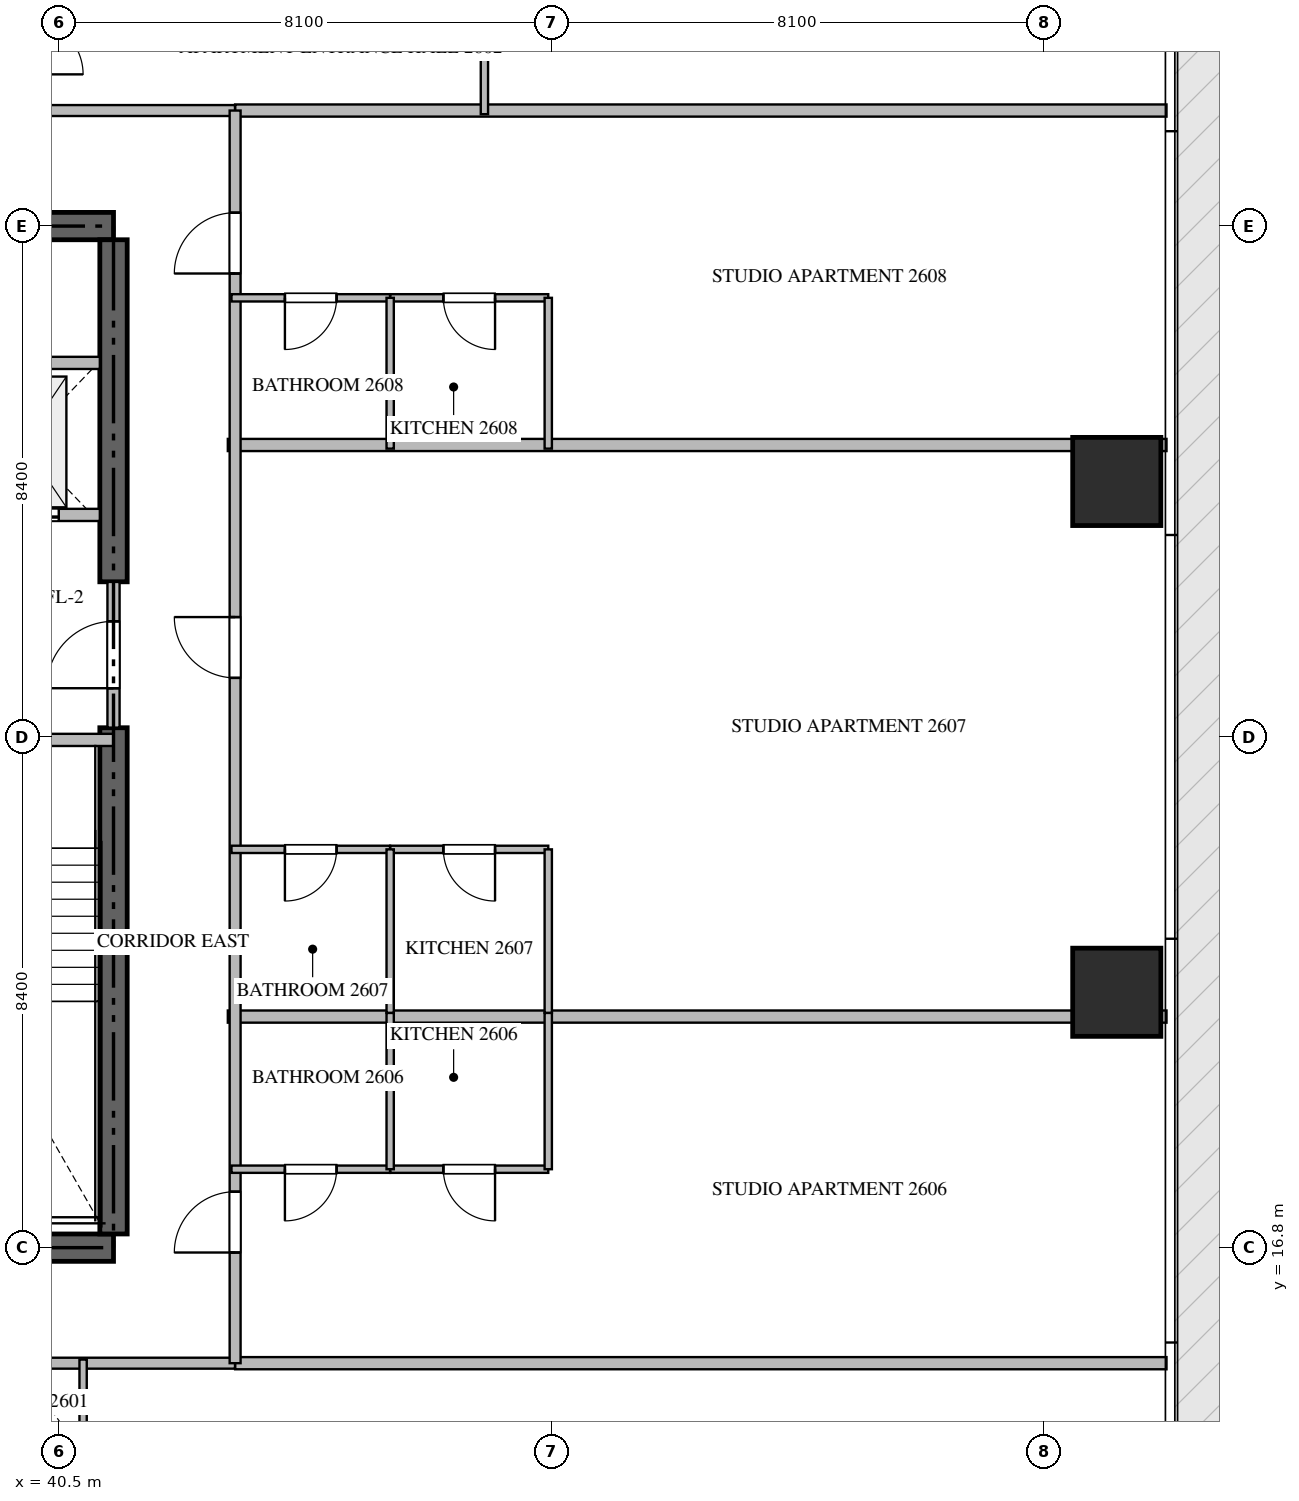
"""IFC4 building model, lengths in metres.
Left out: names, types, materials, properties, quantities, classifications, styles, units other than length and angle.
Written with IfcOpenShell. Run it as: python <this file> out.ifc"""

import sys

from ifc_helpers import new_model, si_unit, direction, frame, frame_2d, origin, origin_2d, place, context, subcontext, project, spatial, rectangle, extrude, source, transform, mapped, element, fill, save


model = new_model("IFC4")
c1 = context("Model", 3, precision=1e-05, world=origin(), true_north=direction((0.0, 1.0)))
c2 = subcontext(c1, "Body", "Model", "MODEL_VIEW")
j1 = project(units=[si_unit("LENGTHUNIT", "METRE"), si_unit("PLANEANGLEUNIT", "RADIAN")], contexts=[c1])
p1 = place(None, origin())
s1 = spatial("IfcSite", under=j1, at=p1, CompositionType="ELEMENT")
p2 = place(p1, origin())
s2 = spatial("IfcBuilding", under=s1, at=p2, CompositionType="ELEMENT")
p3 = place(p2, frame((0.0, 0.0, 105.45)))
s3 = spatial("IfcBuildingStorey", under=s2, at=p3, CompositionType="ELEMENT", Elevation=105.45)
for number, where, z_axis, x_axis in (
    (1, (23.4, 16.8, -0.26), (0.0, 0.0, 1.0), (1.0, 0.0, 0.0)),
    (2, (41.4, 33.6, -0.26), (0.0, 0.0, 1.0), (-1.0, 0.0, 0.0)),
):
    element("IfcWall", number, at=place(p3, frame(where, z_axis=z_axis, x_axis=x_axis)), inside=s3, PredefinedType="SHEAR", context=c2, shape_type="SweptSolid", body=[
        extrude(rectangle(XDim=18.0, YDim=0.45, at=frame_2d((9.0, 0.0))), origin(), (0.0, 0.0, 1.0), 3.648),
    ])
p4 = place(p3, frame((41.4, 17.025, -0.26), z_axis=(0.0, 0.0, 1.0), x_axis=(0.0, 1.0, 0.0)))
e3 = element("IfcWall", 3, at=p4, inside=s3, PredefinedType="SHEAR", context=c2, shape_type="SweptSolid", body=[
    extrude(rectangle(XDim=8.325, YDim=0.45, at=frame_2d((4.163, 0.0))), origin(), (0.0, 0.0, 1.0), 3.648),
])
p5 = place(p3, frame((41.4, 27.75, -0.26), z_axis=(0.0, 0.0, 1.0), x_axis=(0.0, 1.0, 0.0)))
e4 = element("IfcWall", 4, at=p5, inside=s3, PredefinedType="SHEAR", context=c2, shape_type="SweptSolid", body=[
    extrude(rectangle(XDim=5.625, YDim=0.45, at=frame_2d((2.812, 0.0))), origin(), (0.0, 0.0, 1.0), 3.648),
])
m1 = source(origin(), c2, "Body", "SweptSolid", [
    extrude(rectangle(XDim=1.45, YDim=1.45, at=origin_2d()), origin(), (0.0, 0.0, 1.0), 3.65),
])
for number, where, z_axis, x_axis in (
    (5, (57.9, 21.0, -0.26), (0.0, 0.0, 1.0), (1.0, 0.0, 0.0)),
    (6, (57.9, 29.4, -0.26), (0.0, 0.0, 1.0), (1.0, 0.0, 0.0)),
):
    element("IfcColumn", number, at=place(p3, frame(where, z_axis=z_axis, x_axis=x_axis)), inside=s3, PredefinedType="COLUMN", context=c2, shape_type="MappedRepresentation", body=[
        mapped(m1, transform((0.0, 0.0, 0.0), scale=1.0)),
    ])
p6 = place(p3, frame((36.95, 25.15, 0.0), z_axis=(0.0, 0.0, 1.0), x_axis=(1.0, 0.0, 0.0)))
e7 = element("IfcWall", 7, at=p6, inside=s3, PredefinedType="STANDARD", context=c2, shape_type="SweptSolid", body=[
    extrude(rectangle(XDim=4.45, YDim=0.2, at=frame_2d((2.225, 0.0))), origin(), (0.0, 0.0, 1.0), 3.39),
])
p7 = place(p6, frame((1.65, 0.0, 0.0)))
e8 = element("IfcOpeningElement", 8, at=p7, cuts=e7, PredefinedType="OPENING", context=c2, shape_type="SweptSolid", body=[
    extrude(rectangle(XDim=1.1, YDim=2.15, at=frame_2d((0.55, 1.075))), frame((0.0, 0.11, 0.0), z_axis=(0.0, -1.0, 0.0), x_axis=(1.0, 0.0, 0.0)), (0.0, 0.0, 1.0), 0.22),
])
p8 = place(p3, frame((38.75, 28.85, 0.0), z_axis=(0.0, 0.0, 1.0), x_axis=(1.0, 0.0, 0.0)))
e9 = element("IfcWall", 9, at=p8, inside=s3, PredefinedType="STANDARD", context=c2, shape_type="SweptSolid", body=[
    extrude(rectangle(XDim=2.425, YDim=0.2, at=frame_2d((1.212, 0.0))), origin(), (0.0, 0.0, 1.0), 3.39),
])
p9 = place(p8, frame((0.55, 0.0, 0.0)))
e10 = element("IfcOpeningElement", 10, at=p9, cuts=e9, PredefinedType="OPENING", context=c2, shape_type="SweptSolid", body=[
    extrude(rectangle(XDim=1.2, YDim=2.2, at=frame_2d((0.6, 1.1))), frame((0.0, 0.11, 0.0), z_axis=(0.0, -1.0, 0.0), x_axis=(1.0, 0.0, 0.0)), (0.0, 0.0, 1.0), 0.22),
])
p10 = place(p3, frame((38.75, 31.35, 0.0), z_axis=(0.0, 0.0, 1.0), x_axis=(1.0, 0.0, 0.0)))
e11 = element("IfcWall", 11, at=p10, inside=s3, PredefinedType="STANDARD", context=c2, shape_type="SweptSolid", body=[
    extrude(rectangle(XDim=2.425, YDim=0.2, at=frame_2d((1.212, 0.0))), origin(), (0.0, 0.0, 1.0), 3.39),
])
p11 = place(p3, frame((41.4, 25.352, 0.0), z_axis=(0.0, 0.0, 1.0), x_axis=(0.0, 1.0, 0.0)))
e12 = element("IfcWall", 12, at=p11, inside=s3, PredefinedType="STANDARD", context=c2, shape_type="SweptSolid", body=[
    extrude(rectangle(XDim=2.396, YDim=0.2, at=frame_2d((1.198, 0.0))), origin(), (0.0, 0.0, 1.0), 3.39),
])
p12 = place(p11, frame((0.648, 0.0, 0.0)))
e13 = element("IfcOpeningElement", 13, at=p12, cuts=e12, PredefinedType="OPENING", context=c2, shape_type="SweptSolid", body=[
    extrude(rectangle(XDim=1.1, YDim=2.15, at=frame_2d((0.55, 1.075))), frame((0.0, 0.11, 0.0), z_axis=(0.0, -1.0, 0.0), x_axis=(1.0, 0.0, 0.0)), (0.0, 0.0, 1.0), 0.22),
])
for number, where, z_axis, x_axis in (
    (14, (43.28, 20.6, 0.0), (0.0, 0.0, 1.0), (1.0, 0.0, 0.0)),
    (15, (43.28, 30.0, 0.0), (0.0, 0.0, 1.0), (1.0, 0.0, 0.0)),
):
    element("IfcWall", number, at=place(p3, frame(where, z_axis=z_axis, x_axis=x_axis)), inside=s3, PredefinedType="PARTITIONING", context=c2, shape_type="SweptSolid", body=[
        extrude(rectangle(XDim=15.438, YDim=0.2, at=frame_2d((7.719, 0.0))), origin(), (0.0, 0.0, 1.0), 3.39),
    ])
for number, where, z_axis, x_axis in (
    (16, (43.4, 14.9, 0.0), (0.0, 0.0, 1.0), (1.0, 0.0, 0.0)),
    (17, (43.4, 35.5, 0.0), (0.0, 0.0, 1.0), (1.0, 0.0, 0.0)),
):
    element("IfcWall", number, at=place(p3, frame(where, z_axis=z_axis, x_axis=x_axis)), inside=s3, PredefinedType="PARTITIONING", context=c2, shape_type="SweptSolid", body=[
        extrude(rectangle(XDim=15.318, YDim=0.2, at=frame_2d((7.659, 0.0))), origin(), (0.0, 0.0, 1.0), 3.39),
    ])
p13 = place(p3, frame((21.402, 14.9, 0.0), z_axis=(0.0, 0.0, 1.0), x_axis=(1.0, 0.0, 0.0)))
e18 = element("IfcWall", 18, at=p13, inside=s3, PredefinedType="PARTITIONING", context=c2, shape_type="SweptSolid", body=[
    extrude(rectangle(XDim=21.996, YDim=0.18, at=frame_2d((10.998, 0.0))), origin(), (0.0, 0.0, 1.0), 3.39),
])
p14 = place(p13, frame((7.202, 0.0, 0.0)))
e19 = element("IfcOpeningElement", 19, at=p14, cuts=e18, PredefinedType="OPENING", context=c2, shape_type="SweptSolid", body=[
    extrude(rectangle(XDim=1.0, YDim=2.15, at=frame_2d((0.5, 1.075))), frame((0.0, 0.1, 0.0), z_axis=(0.0, -1.0, 0.0), x_axis=(1.0, 0.0, 0.0)), (0.0, 0.0, 1.0), 0.2),
])
p15 = place(p3, frame((21.402, 35.5, 0.0), z_axis=(0.0, 0.0, 1.0), x_axis=(1.0, 0.0, 0.0)))
e20 = element("IfcWall", 20, at=p15, inside=s3, PredefinedType="PARTITIONING", context=c2, shape_type="SweptSolid", body=[
    extrude(rectangle(XDim=21.996, YDim=0.18, at=frame_2d((10.998, 0.0))), origin(), (0.0, 0.0, 1.0), 3.39),
])
p16 = place(p15, frame((15.222, 0.0, 0.0)))
e21 = element("IfcOpeningElement", 21, at=p16, cuts=e20, PredefinedType="OPENING", context=c2, shape_type="SweptSolid", body=[
    extrude(rectangle(XDim=1.0, YDim=2.15, at=frame_2d((0.5, 1.075))), frame((0.0, 0.1, 0.0), z_axis=(0.0, -1.0, 0.0), x_axis=(1.0, 0.0, 0.0)), (0.0, 0.0, 1.0), 0.2),
])
p17 = place(p3, frame((43.4, 14.9, 0.0), z_axis=(0.0, 0.0, 1.0), x_axis=(0.0, 1.0, 0.0)))
e22 = element("IfcWall", 22, at=p17, inside=s3, PredefinedType="PARTITIONING", context=c2, shape_type="SweptSolid", body=[
    extrude(rectangle(XDim=20.6, YDim=0.18, at=frame_2d((10.3, 0.0))), origin(), (0.0, 0.0, 1.0), 3.39),
])
p18 = place(p17, frame((1.82, 0.0, 0.0)))
e23 = element("IfcOpeningElement", 23, at=p18, cuts=e22, PredefinedType="OPENING", context=c2, shape_type="SweptSolid", body=[
    extrude(rectangle(XDim=1.0, YDim=2.15, at=frame_2d((0.5, 1.075))), frame((0.0, 0.1, 0.0), z_axis=(0.0, -1.0, 0.0), x_axis=(1.0, 0.0, 0.0)), (0.0, 0.0, 1.0), 0.2),
])
p19 = place(p17, frame((11.27, 0.0, 0.0)))
e24 = element("IfcOpeningElement", 24, at=p19, cuts=e22, PredefinedType="OPENING", context=c2, shape_type="SweptSolid", body=[
    extrude(rectangle(XDim=1.0, YDim=2.15, at=frame_2d((0.5, 1.075))), frame((0.0, 0.1, 0.0), z_axis=(0.0, -1.0, 0.0), x_axis=(1.0, 0.0, 0.0)), (0.0, 0.0, 1.0), 0.2),
])
p20 = place(p17, frame((17.92, 0.0, 0.0)))
e25 = element("IfcOpeningElement", 25, at=p20, cuts=e22, PredefinedType="OPENING", context=c2, shape_type="SweptSolid", body=[
    extrude(rectangle(XDim=1.0, YDim=2.15, at=frame_2d((0.5, 1.075))), frame((0.0, 0.1, 0.0), z_axis=(0.0, -1.0, 0.0), x_axis=(1.0, 0.0, 0.0)), (0.0, 0.0, 1.0), 0.2),
])
for number, where, z_axis, x_axis in (
    (26, (40.9, 12.752, 0.0), (0.0, 0.0, 1.0), (0.0, 1.0, 0.0)),
    (27, (47.5, 37.648, 0.0), (0.0, 0.0, 1.0), (0.0, -1.0, 0.0)),
):
    element("IfcWall", number, at=place(p3, frame(where, z_axis=z_axis, x_axis=x_axis)), inside=s3, PredefinedType="PARTITIONING", context=c2, shape_type="SweptSolid", body=[
        extrude(rectangle(XDim=2.208, YDim=0.12, at=frame_2d((1.104, 0.0))), origin(), (0.0, 0.0, 1.0), 3.39),
    ])
p21 = place(p3, frame((48.55, 18.09, 0.0), z_axis=(0.0, 0.0, 1.0), x_axis=(-1.0, 0.0, 0.0)))
e28 = element("IfcWall", 28, at=p21, inside=s3, PredefinedType="PARTITIONING", context=c2, shape_type="SweptSolid", body=[
    extrude(rectangle(XDim=2.6, YDim=0.12, at=frame_2d((1.3, 0.0))), origin(), (0.0, 0.0, 1.0), 3.39),
])
p22 = place(p21, frame((0.875, 0.0, 0.0)))
e29 = element("IfcOpeningElement", 29, at=p22, cuts=e28, PredefinedType="OPENING", context=c2, shape_type="SweptSolid", body=[
    extrude(rectangle(XDim=0.85, YDim=2.1, at=frame_2d((0.425, 1.05))), frame((0.0, 0.07, 0.0), z_axis=(0.0, -1.0, 0.0), x_axis=(1.0, 0.0, 0.0)), (0.0, 0.0, 1.0), 0.14),
])
p23 = place(p3, frame((45.948, 18.09, 0.0), z_axis=(0.0, 0.0, 1.0), x_axis=(-1.0, 0.0, 0.0)))
e30 = element("IfcWall", 30, at=p23, inside=s3, PredefinedType="PARTITIONING", context=c2, shape_type="SweptSolid", body=[
    extrude(rectangle(XDim=2.608, YDim=0.12, at=frame_2d((1.304, 0.0))), origin(), (0.0, 0.0, 1.0), 3.39),
])
p24 = place(p23, frame((0.879, 0.0, 0.0)))
e31 = element("IfcOpeningElement", 31, at=p24, cuts=e30, PredefinedType="OPENING", context=c2, shape_type="SweptSolid", body=[
    extrude(rectangle(XDim=0.85, YDim=2.1, at=frame_2d((0.425, 1.05))), frame((0.0, 0.07, 0.0), z_axis=(0.0, -1.0, 0.0), x_axis=(1.0, 0.0, 0.0)), (0.0, 0.0, 1.0), 0.14),
])
for number, where, z_axis, x_axis in (
    (32, (45.95, 18.09, 0.0), (0.0, 0.0, 1.0), (0.0, 1.0, 0.0)),
    (33, (48.55, 18.09, 0.0), (0.0, 0.0, 1.0), (0.0, 1.0, 0.0)),
):
    element("IfcWall", number, at=place(p3, frame(where, z_axis=z_axis, x_axis=x_axis)), inside=s3, PredefinedType="PARTITIONING", context=c2, shape_type="SweptSolid", body=[
        extrude(rectangle(XDim=2.57, YDim=0.12, at=frame_2d((1.285, 0.0))), origin(), (0.0, 0.0, 1.0), 3.39),
    ])
p25 = place(p3, frame((48.55, 23.35, 0.0), z_axis=(0.0, 0.0, 1.0), x_axis=(-1.0, 0.0, 0.0)))
e34 = element("IfcWall", 34, at=p25, inside=s3, PredefinedType="PARTITIONING", context=c2, shape_type="SweptSolid", body=[
    extrude(rectangle(XDim=2.6, YDim=0.12, at=frame_2d((1.3, 0.0))), origin(), (0.0, 0.0, 1.0), 3.39),
])
p26 = place(p25, frame((0.875, 0.0, 0.0)))
e35 = element("IfcOpeningElement", 35, at=p26, cuts=e34, PredefinedType="OPENING", context=c2, shape_type="SweptSolid", body=[
    extrude(rectangle(XDim=0.85, YDim=2.1, at=frame_2d((0.425, 1.05))), frame((0.0, 0.07, 0.0), z_axis=(0.0, -1.0, 0.0), x_axis=(1.0, 0.0, 0.0)), (0.0, 0.0, 1.0), 0.14),
])
p27 = place(p3, frame((45.948, 23.35, 0.0), z_axis=(0.0, 0.0, 1.0), x_axis=(-1.0, 0.0, 0.0)))
e36 = element("IfcWall", 36, at=p27, inside=s3, PredefinedType="PARTITIONING", context=c2, shape_type="SweptSolid", body=[
    extrude(rectangle(XDim=2.608, YDim=0.12, at=frame_2d((1.304, 0.0))), origin(), (0.0, 0.0, 1.0), 3.39),
])
p28 = place(p27, frame((0.879, 0.0, 0.0)))
e37 = element("IfcOpeningElement", 37, at=p28, cuts=e36, PredefinedType="OPENING", context=c2, shape_type="SweptSolid", body=[
    extrude(rectangle(XDim=0.85, YDim=2.1, at=frame_2d((0.425, 1.05))), frame((0.0, 0.07, 0.0), z_axis=(0.0, -1.0, 0.0), x_axis=(1.0, 0.0, 0.0)), (0.0, 0.0, 1.0), 0.14),
])
for number, where, z_axis, x_axis in (
    (38, (45.95, 20.662, 0.0), (0.0, 0.0, 1.0), (0.0, 1.0, 0.0)),
    (39, (48.55, 20.662, 0.0), (0.0, 0.0, 1.0), (0.0, 1.0, 0.0)),
):
    element("IfcWall", number, at=place(p3, frame(where, z_axis=z_axis, x_axis=x_axis)), inside=s3, PredefinedType="PARTITIONING", context=c2, shape_type="SweptSolid", body=[
        extrude(rectangle(XDim=2.688, YDim=0.12, at=frame_2d((1.344, 0.0))), origin(), (0.0, 0.0, 1.0), 3.39),
    ])
p29 = place(p3, frame((48.55, 32.42, 0.0), z_axis=(0.0, 0.0, 1.0), x_axis=(-1.0, 0.0, 0.0)))
e40 = element("IfcWall", 40, at=p29, inside=s3, PredefinedType="PARTITIONING", context=c2, shape_type="SweptSolid", body=[
    extrude(rectangle(XDim=2.6, YDim=0.12, at=frame_2d((1.3, 0.0))), origin(), (0.0, 0.0, 1.0), 3.39),
])
p30 = place(p29, frame((0.875, 0.0, 0.0)))
e41 = element("IfcOpeningElement", 41, at=p30, cuts=e40, PredefinedType="OPENING", context=c2, shape_type="SweptSolid", body=[
    extrude(rectangle(XDim=0.85, YDim=2.1, at=frame_2d((0.425, 1.05))), frame((0.0, 0.07, 0.0), z_axis=(0.0, -1.0, 0.0), x_axis=(1.0, 0.0, 0.0)), (0.0, 0.0, 1.0), 0.14),
])
p31 = place(p3, frame((45.948, 32.42, 0.0), z_axis=(0.0, 0.0, 1.0), x_axis=(-1.0, 0.0, 0.0)))
e42 = element("IfcWall", 42, at=p31, inside=s3, PredefinedType="PARTITIONING", context=c2, shape_type="SweptSolid", body=[
    extrude(rectangle(XDim=2.608, YDim=0.12, at=frame_2d((1.304, 0.0))), origin(), (0.0, 0.0, 1.0), 3.39),
])
p32 = place(p31, frame((0.879, 0.0, 0.0)))
e43 = element("IfcOpeningElement", 43, at=p32, cuts=e42, PredefinedType="OPENING", context=c2, shape_type="SweptSolid", body=[
    extrude(rectangle(XDim=0.85, YDim=2.1, at=frame_2d((0.425, 1.05))), frame((0.0, 0.07, 0.0), z_axis=(0.0, -1.0, 0.0), x_axis=(1.0, 0.0, 0.0)), (0.0, 0.0, 1.0), 0.14),
])
for number, where, z_axis, x_axis in (
    (44, (45.95, 29.94, 0.0), (0.0, 0.0, 1.0), (0.0, 1.0, 0.0)),
    (45, (48.55, 29.94, 0.0), (0.0, 0.0, 1.0), (0.0, 1.0, 0.0)),
):
    element("IfcWall", number, at=place(p3, frame(where, z_axis=z_axis, x_axis=x_axis)), inside=s3, PredefinedType="PARTITIONING", context=c2, shape_type="SweptSolid", body=[
        extrude(rectangle(XDim=2.48, YDim=0.12, at=frame_2d((1.24, 0.0))), origin(), (0.0, 0.0, 1.0), 3.39),
    ])
m2 = source(origin(), c2, "Body", "SweptSolid", [
    extrude(rectangle(XDim=1.2, YDim=2.2, at=frame_2d((0.6, 1.1))), frame((0.0, 0.025, 0.0), z_axis=(0.0, -1.0, 0.0), x_axis=(1.0, 0.0, 0.0)), (0.0, 0.0, 1.0), 0.05),
])
p33 = place(p9, origin())
e46 = element("IfcDoor", 46, at=p33, inside=s3, OperationType="DOUBLE_DOOR_SLIDING", PredefinedType="DOOR", context=c2, shape_type="MappedRepresentation", body=[
    mapped(m2, transform((0.0, 0.0, 0.0), scale=1.0)),
])
fill(e10, e46)
m3 = source(origin(), c2, "Body", "SweptSolid", [
    extrude(rectangle(XDim=1.1, YDim=2.15, at=frame_2d((0.55, 1.075))), frame((0.0, 0.025, 0.0), z_axis=(0.0, -1.0, 0.0), x_axis=(1.0, 0.0, 0.0)), (0.0, 0.0, 1.0), 0.05),
])
p34 = place(p12, origin())
e47 = element("IfcDoor", 47, at=p34, inside=s3, OperationType="SINGLE_SWING_LEFT", PredefinedType="DOOR", context=c2, shape_type="MappedRepresentation", body=[
    mapped(m3, transform((0.0, 0.0, 0.0), scale=1.0)),
])
fill(e13, e47)
m4 = source(origin(), c2, "Body", "SweptSolid", [
    extrude(rectangle(XDim=1.0, YDim=2.15, at=frame_2d((0.5, 1.075))), frame((0.0, 0.025, 0.0), z_axis=(0.0, -1.0, 0.0), x_axis=(1.0, 0.0, 0.0)), (0.0, 0.0, 1.0), 0.05),
])
p35 = place(p18, origin())
e48 = element("IfcDoor", 48, at=p35, inside=s3, OperationType="SINGLE_SWING_LEFT", PredefinedType="DOOR", context=c2, shape_type="MappedRepresentation", body=[
    mapped(m4, transform((0.0, 0.0, 0.0), scale=1.0)),
])
fill(e23, e48)
p36 = place(p19, origin())
e49 = element("IfcDoor", 49, at=p36, inside=s3, OperationType="SINGLE_SWING_RIGHT", PredefinedType="DOOR", context=c2, shape_type="MappedRepresentation", body=[
    mapped(m4, transform((0.0, 0.0, 0.0), scale=1.0)),
])
fill(e24, e49)
p37 = place(p20, origin())
e50 = element("IfcDoor", 50, at=p37, inside=s3, OperationType="SINGLE_SWING_LEFT", PredefinedType="DOOR", context=c2, shape_type="MappedRepresentation", body=[
    mapped(m4, transform((0.0, 0.0, 0.0), scale=1.0)),
])
fill(e25, e50)
m5 = source(origin(), c2, "Body", "SweptSolid", [
    extrude(rectangle(XDim=0.85, YDim=2.1, at=frame_2d((0.425, 1.05))), frame((0.0, 0.025, 0.0), z_axis=(0.0, -1.0, 0.0), x_axis=(1.0, 0.0, 0.0)), (0.0, 0.0, 1.0), 0.05),
])
p38 = place(p22, origin())
e51 = element("IfcDoor", 51, at=p38, inside=s3, OperationType="SINGLE_SWING_LEFT", PredefinedType="DOOR", context=c2, shape_type="MappedRepresentation", body=[
    mapped(m5, transform((0.0, 0.0, 0.0), scale=1.0)),
])
fill(e29, e51)
p39 = place(p24, origin())
e52 = element("IfcDoor", 52, at=p39, inside=s3, OperationType="SINGLE_SWING_RIGHT", PredefinedType="DOOR", context=c2, shape_type="MappedRepresentation", body=[
    mapped(m5, transform((0.0, 0.0, 0.0), scale=1.0)),
])
fill(e31, e52)
p40 = place(p26, origin())
e53 = element("IfcDoor", 53, at=p40, inside=s3, OperationType="SINGLE_SWING_LEFT", PredefinedType="DOOR", context=c2, shape_type="MappedRepresentation", body=[
    mapped(m5, transform((0.0, 0.0, 0.0), scale=1.0)),
])
fill(e35, e53)
p41 = place(p28, origin())
e54 = element("IfcDoor", 54, at=p41, inside=s3, OperationType="SINGLE_SWING_RIGHT", PredefinedType="DOOR", context=c2, shape_type="MappedRepresentation", body=[
    mapped(m5, transform((0.0, 0.0, 0.0), scale=1.0)),
])
fill(e37, e54)
p42 = place(p30, origin())
e55 = element("IfcDoor", 55, at=p42, inside=s3, OperationType="SINGLE_SWING_LEFT", PredefinedType="DOOR", context=c2, shape_type="MappedRepresentation", body=[
    mapped(m5, transform((0.0, 0.0, 0.0), scale=1.0)),
])
fill(e41, e55)
p43 = place(p32, origin())
e56 = element("IfcDoor", 56, at=p43, inside=s3, OperationType="SINGLE_SWING_RIGHT", PredefinedType="DOOR", context=c2, shape_type="MappedRepresentation", body=[
    mapped(m5, transform((0.0, 0.0, 0.0), scale=1.0)),
])
fill(e43, e56)
save(model, sys.argv[1])
